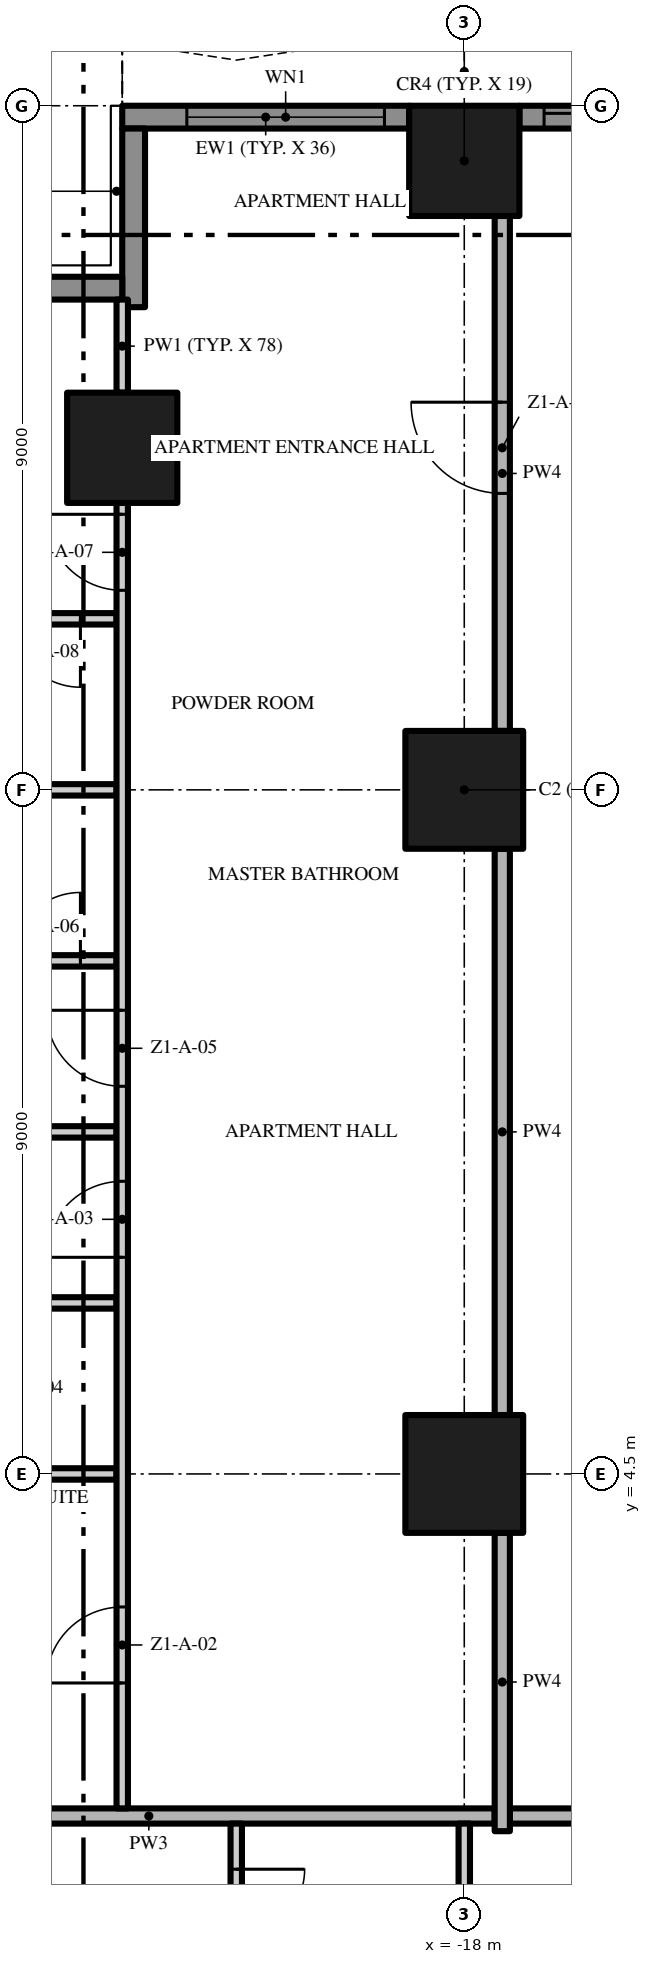
"""IFC4 building model, lengths in metres.
Left out: names, types, materials, properties, quantities, classifications, styles, units other than length and angle.
Written with IfcOpenShell. Run it as: python <this file> out.ifc"""

import sys

from ifc_helpers import new_model, si_unit, direction, frame, frame_2d, origin, origin_2d, place, context, subcontext, project, spatial, polyline, rectangle, outline, extrude, element, fill, save


model = new_model("IFC4")
c1 = context("Model", 3, precision=1e-05, world=origin(), true_north=direction((0.0, 1.0)))
c2 = subcontext(c1, "Body", "Model", "MODEL_VIEW")
j1 = project(units=[si_unit("LENGTHUNIT", "METRE"), si_unit("PLANEANGLEUNIT", "RADIAN")], contexts=[c1])
p1 = place(None, origin())
s1 = spatial("IfcSite", under=j1, at=p1, CompositionType="ELEMENT")
p2 = place(p1, origin())
s2 = spatial("IfcBuilding", under=s1, at=p2, CompositionType="ELEMENT")
p3 = place(p2, frame((0.0, 0.0, 22.6)))
s3 = spatial("IfcBuildingStorey", under=s2, at=p3, CompositionType="ELEMENT", Elevation=22.6)
p4 = place(p3, frame((-18.0, 13.5, 0.0), z_axis=(0.0, 0.0, 1.0), x_axis=(1.0, 0.0, 0.0)))
e1 = element("IfcColumn", 1, at=p4, inside=s3, PredefinedType="COLUMN", context=c2, shape_type="SweptSolid", body=[
    extrude(rectangle(XDim=1.55, YDim=1.55, at=origin_2d()), origin(), (0.0, 0.0, 1.0), 3.5),
])
p5 = place(p3, frame((-18.0, 21.775, 0.0), z_axis=(0.0, 0.0, 1.0), x_axis=(1.0, 0.0, 0.0)))
e2 = element("IfcColumn", 2, at=p5, inside=s3, PredefinedType="COLUMN", context=c2, shape_type="SweptSolid", body=[
    extrude(rectangle(XDim=1.45, YDim=1.45, at=origin_2d()), origin(), (0.0, 0.0, 1.0), 3.5),
])
p6 = place(p3, frame((-18.0, 4.5, 0.0), z_axis=(0.0, 0.0, 1.0), x_axis=(1.0, 0.0, 0.0)))
e3 = element("IfcColumn", 3, at=p6, inside=s3, PredefinedType="COLUMN", context=c2, shape_type="SweptSolid", body=[
    extrude(rectangle(XDim=1.55, YDim=1.55, at=origin_2d()), origin(), (0.0, 0.0, 1.0), 3.5),
])
p7 = place(p3, frame((-22.5, 18.0, 0.0), z_axis=(0.0, 0.0, 1.0), x_axis=(1.0, 0.0, 0.0)))
e4 = element("IfcColumn", 4, at=p7, inside=s3, PredefinedType="COLUMN", context=c2, shape_type="SweptSolid", body=[
    extrude(rectangle(XDim=1.45, YDim=1.45, at=origin_2d()), origin(), (0.0, 0.0, 1.0), 3.5),
])
p8 = place(p3, frame((-17.275, 22.35, 0.0), z_axis=(0.0, 0.0, 1.0), x_axis=(1.0, 0.0, 0.0)))
e5 = element("IfcWall", 5, at=p8, inside=s3, PredefinedType="SOLIDWALL", context=c2, shape_type="SweptSolid", body=[
    extrude(rectangle(XDim=3.775, YDim=0.3, at=frame_2d((1.887, 0.0))), origin(), (0.0, 0.0, 1.0), 3.5),
])
p9 = place(p8, frame((0.325, 0.0, 0.0)))
e6 = element("IfcOpeningElement", 6, at=p9, cuts=e5, PredefinedType="OPENING", context=c2, shape_type="SweptSolid", body=[
    extrude(rectangle(XDim=2.6, YDim=2.4, at=frame_2d((1.3, 1.2))), frame((0.0, 0.16, 0.0), z_axis=(0.0, -1.0, 0.0), x_axis=(1.0, 0.0, 0.0)), (0.0, 0.0, 1.0), 0.32),
])
p10 = place(p3, frame((-22.5, 22.35, 0.0), z_axis=(0.0, 0.0, 1.0), x_axis=(1.0, 0.0, 0.0)))
e7 = element("IfcWall", 7, at=p10, inside=s3, PredefinedType="SOLIDWALL", context=c2, shape_type="SweptSolid", body=[
    extrude(rectangle(XDim=3.775, YDim=0.3, at=frame_2d((1.887, 0.0))), origin(), (0.0, 0.0, 1.0), 3.5),
])
p11 = place(p10, frame((0.85, 0.0, 0.45)))
e8 = element("IfcOpeningElement", 8, at=p11, cuts=e7, PredefinedType="OPENING", context=c2, shape_type="SweptSolid", body=[
    extrude(rectangle(XDim=2.6, YDim=2.65, at=frame_2d((1.3, 1.325))), frame((0.0, 0.16, 0.0), z_axis=(0.0, -1.0, 0.0), x_axis=(1.0, 0.0, 0.0)), (0.0, 0.0, 1.0), 0.32),
])
p12 = place(p3, frame((-22.35, 19.85, 0.0), z_axis=(0.0, 0.0, 1.0), x_axis=(0.0, 1.0, 0.0)))
e9 = element("IfcWall", 9, at=p12, inside=s3, PredefinedType="SOLIDWALL", context=c2, shape_type="SweptSolid", body=[
    extrude(rectangle(XDim=2.35, YDim=0.3, at=frame_2d((1.175, 0.0))), origin(), (0.0, 0.0, 1.0), 3.5),
])
p13 = place(p3, frame((-24.75, 20.1, 0.0), z_axis=(0.0, 0.0, 1.0), x_axis=(1.0, 0.0, 0.0)))
e10 = element("IfcWall", 10, at=p13, inside=s3, PredefinedType="SOLIDWALL", context=c2, shape_type="SweptSolid", body=[
    extrude(rectangle(XDim=2.25, YDim=0.3, at=frame_2d((1.125, 0.0))), origin(), (0.0, 0.0, 1.0), 3.5),
])
p14 = place(p3, origin())
e11 = element("IfcWall", 11, at=p14, inside=s3, PredefinedType="USERDEFINED", context=c2, shape_type="SweptSolid", body=[
    extrude(outline(polyline([(-13.5, 25.5), (-15.0, 25.271), (-16.5, 24.671), (-18.0, 23.929), (-19.5, 23.329), (-21.0, 23.1), (-22.5, 23.329), (-22.538, 23.082), (-21.0, 22.847), (-19.434, 23.086), (-17.898, 23.701), (-16.398, 24.442), (-14.934, 25.028), (-13.462, 25.253), (-13.5, 25.5)])), origin(), (0.0, 0.0, 1.0), 0.9),
])
p15 = place(p3, frame((-17.4, 0.0, 0.0), z_axis=(0.0, 0.0, 1.0), x_axis=(1.0, 0.0, 0.0)))
e12 = element("IfcWall", 12, at=p15, inside=s3, PredefinedType="PARTITIONING", context=c2, shape_type="SweptSolid", body=[
    extrude(rectangle(XDim=12.8, YDim=0.2, at=frame_2d((6.4, 0.0))), origin(), (0.0, 0.0, 1.0), 3.5),
])
p16 = place(p3, frame((-26.7, 0.0, 0.0), z_axis=(0.0, 0.0, 1.0), x_axis=(1.0, 0.0, 0.0)))
e13 = element("IfcWall", 13, at=p16, inside=s3, PredefinedType="PARTITIONING", context=c2, shape_type="SweptSolid", body=[
    extrude(rectangle(XDim=9.1, YDim=0.2, at=frame_2d((4.55, 0.0))), origin(), (0.0, 0.0, 1.0), 3.5),
])
p17 = place(p3, frame((-25.55, 4.5, 0.0), z_axis=(0.0, 0.0, 1.0), x_axis=(1.0, 0.0, 0.0)))
e14 = element("IfcWall", 14, at=p17, inside=s3, PredefinedType="PARTITIONING", context=c2, shape_type="SweptSolid", body=[
    extrude(rectangle(XDim=2.975, YDim=0.15, at=frame_2d((1.488, 0.0))), origin(), (0.0, 0.0, 1.0), 3.5),
])
p18 = place(p3, frame((-24.45, 6.75, 0.0), z_axis=(0.0, 0.0, 1.0), x_axis=(1.0, 0.0, 0.0)))
e15 = element("IfcWall", 15, at=p18, inside=s3, PredefinedType="PARTITIONING", context=c2, shape_type="SweptSolid", body=[
    extrude(rectangle(XDim=1.875, YDim=0.15, at=frame_2d((0.938, 0.0))), origin(), (0.0, 0.0, 1.0), 3.5),
])
p19 = place(p3, frame((-26.7, 9.0, 0.0), z_axis=(0.0, 0.0, 1.0), x_axis=(1.0, 0.0, 0.0)))
e16 = element("IfcWall", 16, at=p19, inside=s3, PredefinedType="PARTITIONING", context=c2, shape_type="SweptSolid", body=[
    extrude(rectangle(XDim=4.125, YDim=0.15, at=frame_2d((2.062, 0.0))), origin(), (0.0, 0.0, 1.0), 3.5),
])
p20 = place(p3, frame((-24.45, 11.25, 0.0), z_axis=(0.0, 0.0, 1.0), x_axis=(1.0, 0.0, 0.0)))
e17 = element("IfcWall", 17, at=p20, inside=s3, PredefinedType="PARTITIONING", context=c2, shape_type="SweptSolid", body=[
    extrude(rectangle(XDim=1.875, YDim=0.15, at=frame_2d((0.938, 0.0))), origin(), (0.0, 0.0, 1.0), 3.5),
])
p21 = place(p20, frame((0.5, 0.0, 0.0)))
e18 = element("IfcOpeningElement", 18, at=p21, cuts=e17, PredefinedType="OPENING", context=c2, shape_type="SweptSolid", body=[
    extrude(rectangle(XDim=0.9, YDim=2.1, at=frame_2d((0.45, 1.05))), frame((0.0, 0.085, 0.0), z_axis=(0.0, -1.0, 0.0), x_axis=(1.0, 0.0, 0.0)), (0.0, 0.0, 1.0), 0.17),
])
p22 = place(p3, frame((-24.45, 13.5, 0.0), z_axis=(0.0, 0.0, 1.0), x_axis=(1.0, 0.0, 0.0)))
e19 = element("IfcWall", 19, at=p22, inside=s3, PredefinedType="PARTITIONING", context=c2, shape_type="SweptSolid", body=[
    extrude(rectangle(XDim=1.875, YDim=0.15, at=frame_2d((0.938, 0.0))), origin(), (0.0, 0.0, 1.0), 3.5),
])
p23 = place(p3, frame((-22.575, 15.75, 0.0), z_axis=(0.0, 0.0, 1.0), x_axis=(-1.0, 0.0, 0.0)))
e20 = element("IfcWall", 20, at=p23, inside=s3, PredefinedType="PARTITIONING", context=c2, shape_type="SweptSolid", body=[
    extrude(rectangle(XDim=1.875, YDim=0.15, at=frame_2d((0.938, 0.0))), origin(), (0.0, 0.0, 1.0), 3.5),
])
p24 = place(p23, frame((0.475, 0.0, 0.0)))
e21 = element("IfcOpeningElement", 21, at=p24, cuts=e20, PredefinedType="OPENING", context=c2, shape_type="SweptSolid", body=[
    extrude(rectangle(XDim=0.9, YDim=2.1, at=frame_2d((0.45, 1.05))), frame((0.0, 0.085, 0.0), z_axis=(0.0, -1.0, 0.0), x_axis=(1.0, 0.0, 0.0)), (0.0, 0.0, 1.0), 0.17),
])
p25 = place(p3, frame((-22.5, 0.1, 0.0), z_axis=(0.0, 0.0, 1.0), x_axis=(0.0, 1.0, 0.0)))
e22 = element("IfcWall", 22, at=p25, inside=s3, PredefinedType="PARTITIONING", context=c2, shape_type="SweptSolid", body=[
    extrude(rectangle(XDim=17.175, YDim=0.15, at=frame_2d((8.588, 0.0))), origin(), (0.0, 0.0, 1.0), 3.5),
])
p26 = place(p25, frame((1.65, 0.0, 0.0)))
e23 = element("IfcOpeningElement", 23, at=p26, cuts=e22, PredefinedType="OPENING", context=c2, shape_type="SweptSolid", body=[
    extrude(rectangle(XDim=1.0, YDim=2.4, at=frame_2d((0.5, 1.2))), frame((0.0, 0.085, 0.0), z_axis=(0.0, -1.0, 0.0), x_axis=(1.0, 0.0, 0.0)), (0.0, 0.0, 1.0), 0.17),
])
p27 = place(p25, frame((7.25, 0.0, 0.0)))
e24 = element("IfcOpeningElement", 24, at=p27, cuts=e22, PredefinedType="OPENING", context=c2, shape_type="SweptSolid", body=[
    extrude(rectangle(XDim=1.0, YDim=2.4, at=frame_2d((0.5, 1.2))), frame((0.0, 0.085, 0.0), z_axis=(0.0, -1.0, 0.0), x_axis=(1.0, 0.0, 0.0)), (0.0, 0.0, 1.0), 0.17),
])
p28 = place(p25, frame((9.5, 0.0, 0.0)))
e25 = element("IfcOpeningElement", 25, at=p28, cuts=e22, PredefinedType="OPENING", context=c2, shape_type="SweptSolid", body=[
    extrude(rectangle(XDim=1.0, YDim=2.4, at=frame_2d((0.5, 1.2))), frame((0.0, 0.085, 0.0), z_axis=(0.0, -1.0, 0.0), x_axis=(1.0, 0.0, 0.0)), (0.0, 0.0, 1.0), 0.17),
])
p29 = place(p25, frame((16.025, 0.0, 0.0)))
e26 = element("IfcOpeningElement", 26, at=p29, cuts=e22, PredefinedType="OPENING", context=c2, shape_type="SweptSolid", body=[
    extrude(rectangle(XDim=1.0, YDim=2.4, at=frame_2d((0.5, 1.2))), frame((0.0, 0.085, 0.0), z_axis=(0.0, -1.0, 0.0), x_axis=(1.0, 0.0, 0.0)), (0.0, 0.0, 1.0), 0.17),
])
p30 = place(p3, frame((-22.5, 18.725, 0.0), z_axis=(0.0, 0.0, 1.0), x_axis=(0.0, 1.0, 0.0)))
e27 = element("IfcWall", 27, at=p30, inside=s3, PredefinedType="PARTITIONING", context=c2, shape_type="SweptSolid", body=[
    extrude(rectangle(XDim=1.225, YDim=0.15, at=frame_2d((0.613, 0.0))), origin(), (0.0, 0.0, 1.0), 3.5),
])
p31 = place(p3, frame((-21.0, -0.1, 0.0), z_axis=(0.0, 0.0, 1.0), x_axis=(0.0, -1.0, 0.0)))
e28 = element("IfcWall", 28, at=p31, inside=s3, PredefinedType="PARTITIONING", context=c2, shape_type="SweptSolid", body=[
    extrude(rectangle(XDim=2.225, YDim=0.15, at=frame_2d((1.113, 0.0))), origin(), (0.0, 0.0, 1.0), 3.5),
])
p32 = place(p31, frame((0.6, 0.0, 0.0)))
e29 = element("IfcOpeningElement", 29, at=p32, cuts=e28, PredefinedType="OPENING", context=c2, shape_type="SweptSolid", body=[
    extrude(rectangle(XDim=0.9, YDim=2.1, at=frame_2d((0.45, 1.05))), frame((0.0, 0.085, 0.0), z_axis=(0.0, -1.0, 0.0), x_axis=(1.0, 0.0, 0.0)), (0.0, 0.0, 1.0), 0.17),
])
p33 = place(p3, frame((-18.0, -3.725, 0.0), z_axis=(0.0, 0.0, 1.0), x_axis=(0.0, 1.0, 0.0)))
e30 = element("IfcWall", 30, at=p33, inside=s3, PredefinedType="PARTITIONING", context=c2, shape_type="SweptSolid", body=[
    extrude(rectangle(XDim=3.625, YDim=0.15, at=frame_2d((1.812, 0.0))), origin(), (0.0, 0.0, 1.0), 3.5),
])
p34 = place(p3, frame((-17.5, -0.2, 0.0), z_axis=(0.0, 0.0, 1.0), x_axis=(0.0, 1.0, 0.0)))
e31 = element("IfcWall", 31, at=p34, inside=s3, PredefinedType="PARTITIONING", context=c2, shape_type="SweptSolid", body=[
    extrude(rectangle(XDim=3.925, YDim=0.2, at=frame_2d((1.962, 0.0))), origin(), (0.0, 0.0, 1.0), 3.5),
])
p35 = place(p3, frame((-17.5, 5.275, 0.0), z_axis=(0.0, 0.0, 1.0), x_axis=(0.0, 1.0, 0.0)))
e32 = element("IfcWall", 32, at=p35, inside=s3, PredefinedType="PARTITIONING", context=c2, shape_type="SweptSolid", body=[
    extrude(rectangle(XDim=7.45, YDim=0.2, at=frame_2d((3.725, 0.0))), origin(), (0.0, 0.0, 1.0), 3.5),
])
p36 = place(p3, frame((-17.5, 14.275, 0.0), z_axis=(0.0, 0.0, 1.0), x_axis=(0.0, 1.0, 0.0)))
e33 = element("IfcWall", 33, at=p36, inside=s3, PredefinedType="PARTITIONING", context=c2, shape_type="SweptSolid", body=[
    extrude(rectangle(XDim=6.775, YDim=0.2, at=frame_2d((3.388, 0.0))), origin(), (0.0, 0.0, 1.0), 3.5),
])
p37 = place(p36, frame((3.125, 0.0, 0.0)))
e34 = element("IfcOpeningElement", 34, at=p37, cuts=e33, PredefinedType="OPENING", context=c2, shape_type="SweptSolid", body=[
    extrude(rectangle(XDim=1.2, YDim=2.4, at=frame_2d((0.6, 1.2))), frame((0.0, 0.11, 0.0), z_axis=(0.0, -1.0, 0.0), x_axis=(1.0, 0.0, 0.0)), (0.0, 0.0, 1.0), 0.22),
])
p38 = place(p9, origin())
e35 = element("IfcDoor", 35, at=p38, inside=s3, OperationType="SINGLE_SWING_LEFT", PredefinedType="DOOR", context=c2, shape_type="SweptSolid", body=[
    extrude(rectangle(XDim=2.6, YDim=2.4, at=frame_2d((1.3, 1.2))), frame((0.0, 0.025, 0.0), z_axis=(0.0, -1.0, 0.0), x_axis=(1.0, 0.0, 0.0)), (0.0, 0.0, 1.0), 0.05),
])
fill(e6, e35)
p39 = place(p11, origin())
e36 = element("IfcWindow", 36, at=p39, inside=s3, PartitioningType="SINGLE_PANEL", PredefinedType="WINDOW", context=c2, shape_type="SweptSolid", body=[
    extrude(rectangle(XDim=2.6, YDim=2.65, at=frame_2d((1.3, 1.325))), frame((0.0, 0.03, 0.0), z_axis=(0.0, -1.0, 0.0), x_axis=(1.0, 0.0, 0.0)), (0.0, 0.0, 1.0), 0.06),
])
fill(e8, e36)
p40 = place(p37, origin())
e37 = element("IfcDoor", 37, at=p40, inside=s3, OperationType="SINGLE_SWING_RIGHT", PredefinedType="DOOR", context=c2, shape_type="SweptSolid", body=[
    extrude(rectangle(XDim=1.2, YDim=2.4, at=frame_2d((0.6, 1.2))), frame((0.0, 0.025, 0.0), z_axis=(0.0, -1.0, 0.0), x_axis=(1.0, 0.0, 0.0)), (0.0, 0.0, 1.0), 0.05),
])
fill(e34, e37)
p41 = place(p26, origin())
e38 = element("IfcDoor", 38, at=p41, inside=s3, OperationType="SINGLE_SWING_LEFT", PredefinedType="DOOR", context=c2, shape_type="SweptSolid", body=[
    extrude(rectangle(XDim=1.0, YDim=2.4, at=frame_2d((0.5, 1.2))), frame((0.0, 0.025, 0.0), z_axis=(0.0, -1.0, 0.0), x_axis=(1.0, 0.0, 0.0)), (0.0, 0.0, 1.0), 0.05),
])
fill(e23, e38)
p42 = place(p27, origin())
e39 = element("IfcDoor", 39, at=p42, inside=s3, OperationType="SINGLE_SWING_LEFT", PredefinedType="DOOR", context=c2, shape_type="SweptSolid", body=[
    extrude(rectangle(XDim=1.0, YDim=2.4, at=frame_2d((0.5, 1.2))), frame((0.0, 0.025, 0.0), z_axis=(0.0, -1.0, 0.0), x_axis=(1.0, 0.0, 0.0)), (0.0, 0.0, 1.0), 0.05),
])
fill(e24, e39)
p43 = place(p28, origin())
e40 = element("IfcDoor", 40, at=p43, inside=s3, OperationType="SINGLE_SWING_RIGHT", PredefinedType="DOOR", context=c2, shape_type="SweptSolid", body=[
    extrude(rectangle(XDim=1.0, YDim=2.4, at=frame_2d((0.5, 1.2))), frame((0.0, 0.025, 0.0), z_axis=(0.0, -1.0, 0.0), x_axis=(1.0, 0.0, 0.0)), (0.0, 0.0, 1.0), 0.05),
])
fill(e25, e40)
p44 = place(p21, origin())
e41 = element("IfcDoor", 41, at=p44, inside=s3, OperationType="SINGLE_SWING_RIGHT", PredefinedType="DOOR", context=c2, shape_type="SweptSolid", body=[
    extrude(rectangle(XDim=0.9, YDim=2.1, at=frame_2d((0.45, 1.05))), frame((0.0, 0.025, 0.0), z_axis=(0.0, -1.0, 0.0), x_axis=(1.0, 0.0, 0.0)), (0.0, 0.0, 1.0), 0.05),
])
fill(e18, e41)
p45 = place(p29, origin())
e42 = element("IfcDoor", 42, at=p45, inside=s3, OperationType="SINGLE_SWING_RIGHT", PredefinedType="DOOR", context=c2, shape_type="SweptSolid", body=[
    extrude(rectangle(XDim=1.0, YDim=2.4, at=frame_2d((0.5, 1.2))), frame((0.0, 0.025, 0.0), z_axis=(0.0, -1.0, 0.0), x_axis=(1.0, 0.0, 0.0)), (0.0, 0.0, 1.0), 0.05),
])
fill(e26, e42)
p46 = place(p24, origin())
e43 = element("IfcDoor", 43, at=p46, inside=s3, OperationType="SINGLE_SWING_LEFT", PredefinedType="DOOR", context=c2, shape_type="SweptSolid", body=[
    extrude(rectangle(XDim=0.9, YDim=2.1, at=frame_2d((0.45, 1.05))), frame((0.0, 0.025, 0.0), z_axis=(0.0, -1.0, 0.0), x_axis=(1.0, 0.0, 0.0)), (0.0, 0.0, 1.0), 0.05),
])
fill(e21, e43)
p47 = place(p32, origin())
e44 = element("IfcDoor", 44, at=p47, inside=s3, OperationType="SINGLE_SWING_LEFT", PredefinedType="DOOR", context=c2, shape_type="SweptSolid", body=[
    extrude(rectangle(XDim=0.9, YDim=2.1, at=frame_2d((0.45, 1.05))), frame((0.0, 0.025, 0.0), z_axis=(0.0, -1.0, 0.0), x_axis=(1.0, 0.0, 0.0)), (0.0, 0.0, 1.0), 0.05),
])
fill(e29, e44)
save(model, sys.argv[1])
